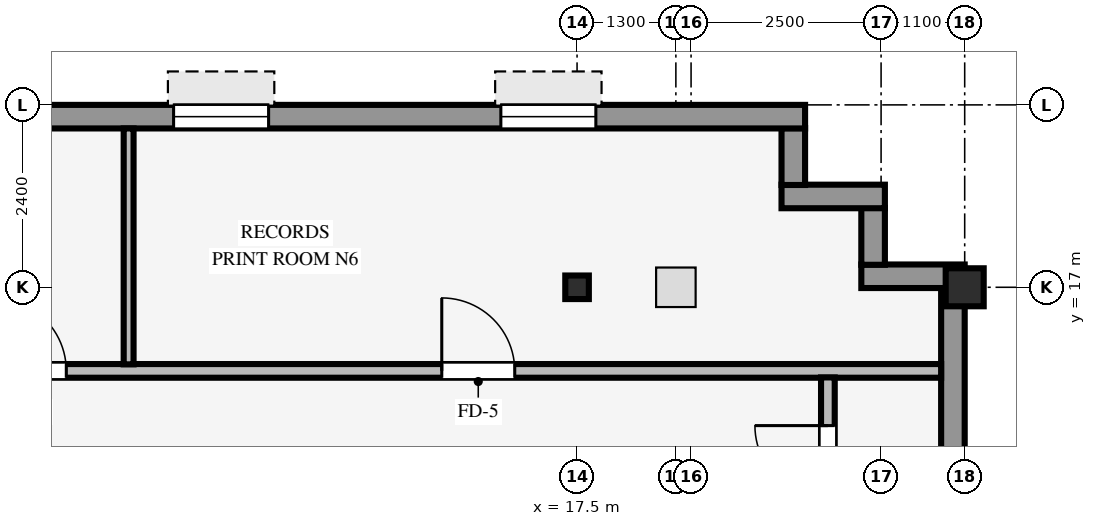
"""IFC4 building model, lengths in metres.
Left out: names, types, materials, properties, quantities, classifications, styles, units other than length and angle.
Written with IfcOpenShell. Run it as: python <this file> out.ifc"""

import sys

from ifc_helpers import new_model, si_unit, direction, frame, frame_2d, origin, origin_2d, place, context, subcontext, project, spatial, rectangle, hollow_rectangle, i_section, extrude, source, transform, mapped, element, fill, save


model = new_model("IFC4")
c1 = context("Model", 3, precision=1e-05, world=origin(), true_north=direction((0.0, 1.0)))
c2 = subcontext(c1, "Body", "Model", "MODEL_VIEW")
j1 = project(units=[si_unit("LENGTHUNIT", "METRE"), si_unit("PLANEANGLEUNIT", "RADIAN")], contexts=[c1])
p1 = place(None, origin())
s1 = spatial("IfcSite", under=j1, at=p1, CompositionType="ELEMENT")
p2 = place(p1, origin())
s2 = spatial("IfcBuilding", under=s1, at=p2, CompositionType="ELEMENT")
p3 = place(p2, frame((0.0, 0.0, 205.5)))
s3 = spatial("IfcBuildingStorey", under=s2, at=p3, CompositionType="ELEMENT", Elevation=205.5)
p4 = place(p3, frame((22.6, 17.0, 0.0), z_axis=(0.0, 0.0, 1.0), x_axis=(1.0, 0.0, 0.0)))
e1 = element("IfcColumn", 1, at=p4, inside=s3, PredefinedType="COLUMN", context=c2, shape_type="SweptSolid", body=[
    extrude(hollow_rectangle(XDim=0.5, YDim=0.5, WallThickness=0.032, InnerFilletRadius=0.032, OuterFilletRadius=0.064, at=origin_2d()), origin(), (0.0, 0.0, 1.0), 3.25),
])
p5 = place(p3, frame((17.5, 17.0, 0.0), z_axis=(0.0, 0.0, 1.0), x_axis=(1.0, 0.0, 0.0)))
e2 = element("IfcColumn", 2, at=p5, inside=s3, PredefinedType="COLUMN", context=c2, shape_type="SweptSolid", body=[
    extrude(i_section(OverallWidth=0.31, OverallDepth=0.31, WebThickness=0.015, FlangeThickness=0.015, FilletRadius=0.015, at=origin_2d()), origin(), (0.0, 0.0, 1.0), 3.25),
])
p6 = place(p3, frame((22.445, -20.794, 0.0), z_axis=(0.0, 0.0, 1.0), x_axis=(0.0, 1.0, 0.0)))
e3 = element("IfcWall", 3, at=p6, inside=s3, PredefinedType="STANDARD", context=c2, shape_type="SweptSolid", body=[
    extrude(rectangle(XDim=37.788, YDim=0.31, at=frame_2d((18.894, 0.0))), origin(), (0.0, 0.0, 1.0), 3.24),
])
p7 = place(p6, frame((16.444, 0.0, 0.0), z_axis=(0.0, 0.0, 1.0), x_axis=(-1.0, 0.0, 0.0)))
e4 = element("IfcOpeningElement", 4, at=p7, cuts=e3, PredefinedType="OPENING", context=c2, shape_type="SweptSolid", body=[
    extrude(rectangle(XDim=1.05, YDim=2.1, at=frame_2d((0.525, 1.05))), frame((0.0, 0.165, 0.0), z_axis=(0.0, -1.0, 0.0), x_axis=(1.0, 0.0, 0.0)), (0.0, 0.0, 1.0), 0.33),
])
p8 = place(p6, frame((7.644, 0.0, 0.8)))
e5 = element("IfcOpeningElement", 5, at=p8, cuts=e3, PredefinedType="OPENING", context=c2, shape_type="SweptSolid", body=[
    extrude(rectangle(XDim=2.05, YDim=1.52, at=frame_2d((1.025, 0.76))), frame((0.0, 0.165, 0.0), z_axis=(0.0, -1.0, 0.0), x_axis=(1.0, 0.0, 0.0)), (0.0, 0.0, 1.0), 0.33),
])
p9 = place(p6, frame((12.756, 0.0, 0.8)))
e6 = element("IfcOpeningElement", 6, at=p9, cuts=e3, PredefinedType="OPENING", context=c2, shape_type="SweptSolid", body=[
    extrude(rectangle(XDim=2.05, YDim=1.52, at=frame_2d((1.025, 0.76))), frame((0.0, 0.165, 0.0), z_axis=(0.0, -1.0, 0.0), x_axis=(1.0, 0.0, 0.0)), (0.0, 0.0, 1.0), 0.33),
])
p10 = place(p6, frame((17.869, 0.0, 0.8)))
e7 = element("IfcOpeningElement", 7, at=p10, cuts=e3, PredefinedType="OPENING", context=c2, shape_type="SweptSolid", body=[
    extrude(rectangle(XDim=2.05, YDim=1.52, at=frame_2d((1.025, 0.76))), frame((0.0, 0.165, 0.0), z_axis=(0.0, -1.0, 0.0), x_axis=(1.0, 0.0, 0.0)), (0.0, 0.0, 1.0), 0.33),
])
p11 = place(p6, frame((22.982, 0.0, 0.8)))
e8 = element("IfcOpeningElement", 8, at=p11, cuts=e3, PredefinedType="OPENING", context=c2, shape_type="SweptSolid", body=[
    extrude(rectangle(XDim=2.05, YDim=1.52, at=frame_2d((1.025, 0.76))), frame((0.0, 0.165, 0.0), z_axis=(0.0, -1.0, 0.0), x_axis=(1.0, 0.0, 0.0)), (0.0, 0.0, 1.0), 0.33),
])
p12 = place(p6, frame((27.194, 0.0, 0.8)))
e9 = element("IfcOpeningElement", 9, at=p12, cuts=e3, PredefinedType="OPENING", context=c2, shape_type="SweptSolid", body=[
    extrude(rectangle(XDim=2.05, YDim=1.52, at=frame_2d((1.025, 0.76))), frame((0.0, 0.165, 0.0), z_axis=(0.0, -1.0, 0.0), x_axis=(1.0, 0.0, 0.0)), (0.0, 0.0, 1.0), 0.33),
])
p13 = place(p6, frame((33.207, 0.0, 0.8)))
e10 = element("IfcOpeningElement", 10, at=p13, cuts=e3, PredefinedType="OPENING", context=c2, shape_type="SweptSolid", body=[
    extrude(rectangle(XDim=2.05, YDim=1.52, at=frame_2d((1.025, 0.76))), frame((0.0, 0.165, 0.0), z_axis=(0.0, -1.0, 0.0), x_axis=(1.0, 0.0, 0.0)), (0.0, 0.0, 1.0), 0.33),
])
p14 = place(p3, frame((21.24, 17.145, 0.0), z_axis=(0.0, 0.0, 1.0), x_axis=(1.0, 0.0, 0.0)))
e11 = element("IfcWall", 11, at=p14, inside=s3, PredefinedType="STANDARD", context=c2, shape_type="SweptSolid", body=[
    extrude(rectangle(XDim=1.36, YDim=0.31, at=frame_2d((0.68, 0.0))), origin(), (0.0, 0.0, 1.0), 1.835),
])
p15 = place(p3, frame((21.395, 17.296, 0.0), z_axis=(0.0, 0.0, 1.0), x_axis=(0.0, 1.0, 0.0)))
e12 = element("IfcWall", 12, at=p15, inside=s3, PredefinedType="STANDARD", context=c2, shape_type="SweptSolid", body=[
    extrude(rectangle(XDim=0.748, YDim=0.31, at=frame_2d((0.374, 0.0))), origin(), (0.0, 0.0, 1.0), 1.835),
])
p16 = place(p3, frame((20.19, 18.195, 0.0), z_axis=(0.0, 0.0, 1.0), x_axis=(1.0, 0.0, 0.0)))
e13 = element("IfcWall", 13, at=p16, inside=s3, PredefinedType="STANDARD", context=c2, shape_type="SweptSolid", body=[
    extrude(rectangle(XDim=1.36, YDim=0.31, at=frame_2d((0.68, 0.0))), origin(), (0.0, 0.0, 1.0), 1.835),
])
p17 = place(p3, frame((20.345, 18.346, 0.0), z_axis=(0.0, 0.0, 1.0), x_axis=(0.0, 1.0, 0.0)))
e14 = element("IfcWall", 14, at=p17, inside=s3, PredefinedType="STANDARD", context=c2, shape_type="SweptSolid", body=[
    extrude(rectangle(XDim=0.748, YDim=0.31, at=frame_2d((0.374, 0.0))), origin(), (0.0, 0.0, 1.0), 1.835),
])
p18 = place(p3, frame((-24.3, 19.245, 0.0), z_axis=(0.0, 0.0, 1.0), x_axis=(1.0, 0.0, 0.0)))
e15 = element("IfcWall", 15, at=p18, inside=s3, PredefinedType="STANDARD", context=c2, shape_type="SweptSolid", body=[
    extrude(rectangle(XDim=44.8, YDim=0.31, at=frame_2d((22.4, 0.0))), origin(), (0.0, 0.0, 1.0), 2.585),
])
p19 = place(p18, frame((2.753, 0.0, 0.8)))
e16 = element("IfcOpeningElement", 16, at=p19, cuts=e15, PredefinedType="OPENING", context=c2, shape_type="SweptSolid", body=[
    extrude(rectangle(XDim=1.25, YDim=1.52, at=frame_2d((0.625, 0.76))), frame((0.0, 0.165, 0.0), z_axis=(0.0, -1.0, 0.0), x_axis=(1.0, 0.0, 0.0)), (0.0, 0.0, 1.0), 0.33),
])
p20 = place(p18, frame((7.508, 0.0, 0.8)))
e17 = element("IfcOpeningElement", 17, at=p20, cuts=e15, PredefinedType="OPENING", context=c2, shape_type="SweptSolid", body=[
    extrude(rectangle(XDim=1.25, YDim=1.52, at=frame_2d((0.625, 0.76))), frame((0.0, 0.165, 0.0), z_axis=(0.0, -1.0, 0.0), x_axis=(1.0, 0.0, 0.0)), (0.0, 0.0, 1.0), 0.33),
])
p21 = place(p18, frame((13.164, 0.0, 0.8)))
e18 = element("IfcOpeningElement", 18, at=p21, cuts=e15, PredefinedType="OPENING", context=c2, shape_type="SweptSolid", body=[
    extrude(rectangle(XDim=1.25, YDim=1.52, at=frame_2d((0.625, 0.76))), frame((0.0, 0.165, 0.0), z_axis=(0.0, -1.0, 0.0), x_axis=(1.0, 0.0, 0.0)), (0.0, 0.0, 1.0), 0.33),
])
p22 = place(p18, frame((17.019, 0.0, 0.8)))
e19 = element("IfcOpeningElement", 19, at=p22, cuts=e15, PredefinedType="OPENING", context=c2, shape_type="SweptSolid", body=[
    extrude(rectangle(XDim=1.25, YDim=1.52, at=frame_2d((0.625, 0.76))), frame((0.0, 0.165, 0.0), z_axis=(0.0, -1.0, 0.0), x_axis=(1.0, 0.0, 0.0)), (0.0, 0.0, 1.0), 0.33),
])
p23 = place(p18, frame((21.775, 0.0, 0.8)))
e20 = element("IfcOpeningElement", 20, at=p23, cuts=e15, PredefinedType="OPENING", context=c2, shape_type="SweptSolid", body=[
    extrude(rectangle(XDim=1.25, YDim=1.52, at=frame_2d((0.625, 0.76))), frame((0.0, 0.165, 0.0), z_axis=(0.0, -1.0, 0.0), x_axis=(1.0, 0.0, 0.0)), (0.0, 0.0, 1.0), 0.33),
])
p24 = place(p18, frame((26.531, 0.0, 0.8)))
e21 = element("IfcOpeningElement", 21, at=p24, cuts=e15, PredefinedType="OPENING", context=c2, shape_type="SweptSolid", body=[
    extrude(rectangle(XDim=1.25, YDim=1.52, at=frame_2d((0.625, 0.76))), frame((0.0, 0.165, 0.0), z_axis=(0.0, -1.0, 0.0), x_axis=(1.0, 0.0, 0.0)), (0.0, 0.0, 1.0), 0.33),
])
p25 = place(p18, frame((31.286, 0.0, 0.8)))
e22 = element("IfcOpeningElement", 22, at=p25, cuts=e15, PredefinedType="OPENING", context=c2, shape_type="SweptSolid", body=[
    extrude(rectangle(XDim=1.25, YDim=1.52, at=frame_2d((0.625, 0.76))), frame((0.0, 0.165, 0.0), z_axis=(0.0, -1.0, 0.0), x_axis=(1.0, 0.0, 0.0)), (0.0, 0.0, 1.0), 0.33),
])
p26 = place(p18, frame((36.492, 0.0, 0.8)))
e23 = element("IfcOpeningElement", 23, at=p26, cuts=e15, PredefinedType="OPENING", context=c2, shape_type="SweptSolid", body=[
    extrude(rectangle(XDim=1.25, YDim=1.52, at=frame_2d((0.625, 0.76))), frame((0.0, 0.165, 0.0), z_axis=(0.0, -1.0, 0.0), x_axis=(1.0, 0.0, 0.0)), (0.0, 0.0, 1.0), 0.33),
])
p27 = place(p18, frame((40.797, 0.0, 0.8)))
e24 = element("IfcOpeningElement", 24, at=p27, cuts=e15, PredefinedType="OPENING", context=c2, shape_type="SweptSolid", body=[
    extrude(rectangle(XDim=1.25, YDim=1.52, at=frame_2d((0.625, 0.76))), frame((0.0, 0.165, 0.0), z_axis=(0.0, -1.0, 0.0), x_axis=(1.0, 0.0, 0.0)), (0.0, 0.0, 1.0), 0.33),
])
p28 = place(p3, frame((-26.09, 15.9, 0.0), z_axis=(0.0, 0.0, 1.0), x_axis=(1.0, 0.0, 0.0)))
e25 = element("IfcWall", 25, at=p28, inside=s3, PredefinedType="PARTITIONING", context=c2, shape_type="SweptSolid", body=[
    extrude(rectangle(XDim=48.38, YDim=0.18, at=frame_2d((24.19, 0.0))), origin(), (0.0, 0.0, 1.0), 3.24),
])
p29 = place(p28, frame((41.81, 0.0, 0.0)))
e26 = element("IfcOpeningElement", 26, at=p29, cuts=e25, PredefinedType="OPENING", context=c2, shape_type="SweptSolid", body=[
    extrude(rectangle(XDim=0.96, YDim=2.1, at=frame_2d((0.48, 1.05))), frame((0.0, 0.1, 0.0), z_axis=(0.0, -1.0, 0.0), x_axis=(1.0, 0.0, 0.0)), (0.0, 0.0, 1.0), 0.2),
])
p30 = place(p28, frame((17.985, 0.0, 0.0)))
e27 = element("IfcOpeningElement", 27, at=p30, cuts=e25, PredefinedType="OPENING", context=c2, shape_type="SweptSolid", body=[
    extrude(rectangle(XDim=0.96, YDim=2.1, at=frame_2d((0.48, 1.05))), frame((0.0, 0.1, 0.0), z_axis=(0.0, -1.0, 0.0), x_axis=(1.0, 0.0, 0.0)), (0.0, 0.0, 1.0), 0.2),
])
p31 = place(p28, frame((26.55, 0.0, 0.0)))
e28 = element("IfcOpeningElement", 28, at=p31, cuts=e25, PredefinedType="OPENING", context=c2, shape_type="SweptSolid", body=[
    extrude(rectangle(XDim=0.96, YDim=2.1, at=frame_2d((0.48, 1.05))), frame((0.0, 0.1, 0.0), z_axis=(0.0, -1.0, 0.0), x_axis=(1.0, 0.0, 0.0)), (0.0, 0.0, 1.0), 0.2),
])
p32 = place(p28, frame((10.935, 0.0, 0.0)))
e29 = element("IfcOpeningElement", 29, at=p32, cuts=e25, PredefinedType="OPENING", context=c2, shape_type="SweptSolid", body=[
    extrude(rectangle(XDim=0.96, YDim=2.1, at=frame_2d((0.48, 1.05))), frame((0.0, 0.1, 0.0), z_axis=(0.0, -1.0, 0.0), x_axis=(1.0, 0.0, 0.0)), (0.0, 0.0, 1.0), 0.2),
])
p33 = place(p28, frame((35.91, 0.0, 0.0)))
e30 = element("IfcOpeningElement", 30, at=p33, cuts=e25, PredefinedType="OPENING", context=c2, shape_type="SweptSolid", body=[
    extrude(rectangle(XDim=0.96, YDim=2.1, at=frame_2d((0.48, 1.05))), frame((0.0, 0.1, 0.0), z_axis=(0.0, -1.0, 0.0), x_axis=(1.0, 0.0, 0.0)), (0.0, 0.0, 1.0), 0.2),
])
p34 = place(p3, frame((11.6, 15.986, 0.0), z_axis=(0.0, 0.0, 1.0), x_axis=(0.0, 1.0, 0.0)))
e31 = element("IfcWall", 31, at=p34, inside=s3, PredefinedType="PARTITIONING", context=c2, shape_type="SweptSolid", body=[
    extrude(rectangle(XDim=3.104, YDim=0.13, at=frame_2d((1.552, 0.0))), origin(), (0.0, 0.0, 1.0), 3.24),
])
p35 = place(p3, frame((20.8, 13.586, 0.0), z_axis=(0.0, 0.0, 1.0), x_axis=(0.0, 1.0, 0.0)))
e32 = element("IfcWall", 32, at=p35, inside=s3, PredefinedType="PARTITIONING", context=c2, shape_type="SweptSolid", body=[
    extrude(rectangle(XDim=2.228, YDim=0.18, at=frame_2d((1.114, 0.0))), origin(), (0.0, 0.0, 1.0), 3.24),
])
p36 = place(p35, frame((0.634, 0.0, 0.0)))
e33 = element("IfcOpeningElement", 33, at=p36, cuts=e32, PredefinedType="OPENING", context=c2, shape_type="SweptSolid", body=[
    extrude(rectangle(XDim=0.96, YDim=2.1, at=frame_2d((0.48, 1.05))), frame((0.0, 0.1, 0.0), z_axis=(0.0, -1.0, 0.0), x_axis=(1.0, 0.0, 0.0)), (0.0, 0.0, 1.0), 0.2),
])
m1 = source(origin(), c2, "Body", "SweptSolid", [
    extrude(rectangle(XDim=1.25, YDim=1.52, at=frame_2d((0.625, 0.76))), frame((0.0, 0.03, 0.0), z_axis=(0.0, -1.0, 0.0), x_axis=(1.0, 0.0, 0.0)), (0.0, 0.0, 1.0), 0.06),
])
p37 = place(p26, origin())
e34 = element("IfcWindow", 34, at=p37, inside=s3, PartitioningType="SINGLE_PANEL", PredefinedType="WINDOW", context=c2, shape_type="MappedRepresentation", body=[
    mapped(m1, transform((0.0, 0.0, 0.0), scale=1.0)),
])
fill(e23, e34)
p38 = place(p27, origin())
e35 = element("IfcWindow", 35, at=p38, inside=s3, PartitioningType="SINGLE_PANEL", PredefinedType="WINDOW", context=c2, shape_type="MappedRepresentation", body=[
    mapped(m1, transform((0.0, 0.0, 0.0), scale=1.0)),
])
fill(e24, e35)
m2 = source(origin(), c2, "Body", "SweptSolid", [
    extrude(rectangle(XDim=0.96, YDim=2.1, at=frame_2d((0.48, 1.05))), frame((0.0, 0.025, 0.0), z_axis=(0.0, -1.0, 0.0), x_axis=(1.0, 0.0, 0.0)), (0.0, 0.0, 1.0), 0.05),
])
p39 = place(p29, origin())
e36 = element("IfcDoor", 36, at=p39, inside=s3, OperationType="SINGLE_SWING_LEFT", PredefinedType="DOOR", context=c2, shape_type="MappedRepresentation", body=[
    mapped(m2, transform((0.0, 0.0, 0.0), scale=1.0)),
])
fill(e26, e36)
p40 = place(p33, origin())
e37 = element("IfcDoor", 37, at=p40, inside=s3, OperationType="SINGLE_SWING_LEFT", PredefinedType="DOOR", context=c2, shape_type="MappedRepresentation", body=[
    mapped(m2, transform((0.0, 0.0, 0.0), scale=1.0)),
])
fill(e30, e37)
p41 = place(p36, origin())
e38 = element("IfcDoor", 38, at=p41, inside=s3, OperationType="SINGLE_SWING_RIGHT", PredefinedType="DOOR", context=c2, shape_type="MappedRepresentation", body=[
    mapped(m2, transform((0.0, 0.0, 0.0), scale=1.0)),
])
fill(e33, e38)
save(model, sys.argv[1])
